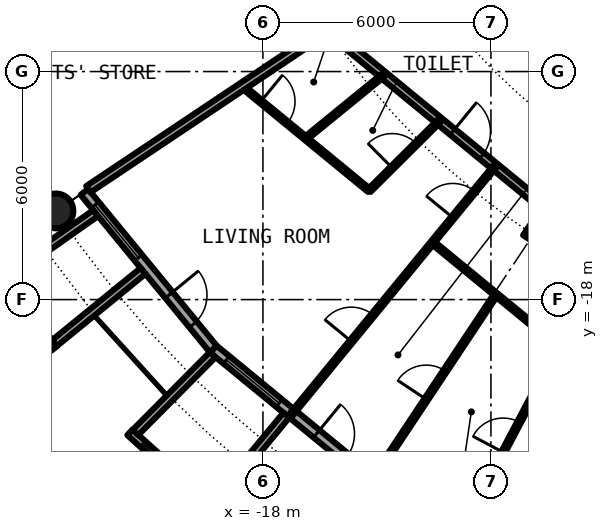
"""IFC4 building model, lengths in metres.
Left out: names, types, materials, properties, quantities, classifications, styles, units other than length and angle.
Written with IfcOpenShell. Run it as: python <this file> out.ifc"""

import sys

from ifc_helpers import new_model, si_unit, direction, frame, frame_2d, origin, origin_2d, place, context, subcontext, project, spatial, rectangle, circle, hollow_circle, i_section, extrude, element, fill, save


model = new_model("IFC4")
c1 = context("Model", 3, precision=1e-05, world=origin(), true_north=direction((0.0, 1.0)))
c2 = subcontext(c1, "Body", "Model", "MODEL_VIEW")
j1 = project(units=[si_unit("LENGTHUNIT", "METRE"), si_unit("PLANEANGLEUNIT", "RADIAN")], contexts=[c1])
p1 = place(None, origin())
s1 = spatial("IfcSite", under=j1, at=p1, CompositionType="ELEMENT")
p2 = place(p1, origin())
s2 = spatial("IfcBuilding", under=s1, at=p2, CompositionType="ELEMENT")
p3 = place(p2, frame((0.0, 0.0, 129.95)))
s3 = spatial("IfcBuildingStorey", under=s2, at=p3, CompositionType="ELEMENT", Elevation=129.95)
p4 = place(p3, frame((-23.448, -15.667, 0.0), z_axis=(0.0, 0.0, 1.0), x_axis=(1.0, 0.0, 0.0)))
e1 = element("IfcColumn", 1, at=p4, inside=s3, PredefinedType="COLUMN", context=c2, shape_type="SweptSolid", body=[
    extrude(hollow_circle(Radius=0.457, WallThickness=0.04, at=origin_2d()), origin(), (0.0, 0.0, 1.0), 3.05),
])
p5 = place(p3, frame((-10.889, -16.297, 0.0), z_axis=(0.0, 0.0, 1.0), x_axis=(-0.55557023302, -0.831469612303, 0.0)))
e2 = element("IfcColumn", 2, at=p5, inside=s3, PredefinedType="COLUMN", context=c2, shape_type="SweptSolid", body=[
    extrude(i_section(OverallWidth=0.307, OverallDepth=0.432, WebThickness=0.021, FlangeThickness=0.04, FilletRadius=0.027, at=origin_2d()), origin(), (0.0, 0.0, 1.0), 3.05),
])
p6 = place(p3, frame((-22.699, -15.167, 0.0), z_axis=(0.0, 0.0, 1.0), x_axis=(0.634382322723, -0.773019449054, 0.0)))
e3 = element("IfcWall", 3, at=p6, inside=s3, PredefinedType="SOLIDWALL", context=c2, shape_type="SweptSolid", body=[
    extrude(rectangle(XDim=5.352, YDim=0.25, at=frame_2d((2.676, 0.0))), origin(), (0.0, 0.0, 1.0), 2.7),
])
p7 = place(p6, frame((0.441, 0.0, 0.3)))
e4 = element("IfcOpeningElement", 4, at=p7, cuts=e3, PredefinedType="OPENING", context=c2, shape_type="SweptSolid", body=[
    extrude(rectangle(XDim=1.8, YDim=2.1, at=frame_2d((0.9, 1.05))), frame((0.0, 0.135, 0.0), z_axis=(0.0, -1.0, 0.0), x_axis=(1.0, 0.0, 0.0)), (0.0, 0.0, 1.0), 0.27),
])
p8 = place(p6, frame((3.51, 0.0, 0.0)))
e5 = element("IfcOpeningElement", 5, at=p8, cuts=e3, PredefinedType="OPENING", context=c2, shape_type="SweptSolid", body=[
    extrude(rectangle(XDim=1.0, YDim=2.2, at=frame_2d((0.5, 1.1))), frame((0.0, 0.135, 0.0), z_axis=(0.0, -1.0, 0.0), x_axis=(1.0, 0.0, 0.0)), (0.0, 0.0, 1.0), 0.27),
])
p9 = place(p3, frame((-24.94, -17.382, -0.03), z_axis=(0.0, 0.0, 1.0), x_axis=(0.603375996329, -0.797456837111, 0.0)))
e6 = element("IfcWall", 6, at=p9, inside=s3, PredefinedType="SOLIDWALL", context=c2, shape_type="SweptSolid", body=[
    extrude(rectangle(XDim=2.391, YDim=0.2, at=frame_2d((1.196, 0.0))), origin(), (0.0, 0.0, 1.0), 2.73),
])
p10 = place(p9, frame((0.156, 0.0, 0.33)))
e7 = element("IfcOpeningElement", 7, at=p10, cuts=e6, PredefinedType="OPENING", context=c2, shape_type="SweptSolid", body=[
    extrude(circle(Radius=1.04, at=frame_2d((1.04, 1.04))), frame((0.0, 0.11, 0.0), z_axis=(0.0, -1.0, 0.0), x_axis=(1.0, 0.0, 0.0)), (0.0, 0.0, 1.0), 0.22),
])
p11 = place(p3, frame((-22.402, -15.726, -0.03), z_axis=(0.0, 0.0, 1.0), x_axis=(-0.818275399393, -0.574826383135, 0.0)))
e8 = element("IfcWall", 8, at=p11, inside=s3, PredefinedType="SOLIDWALL", context=c2, shape_type="SweptSolid", body=[
    extrude(rectangle(XDim=2.929, YDim=0.2, at=frame_2d((1.465, 0.0))), origin(), (0.0, 0.0, 1.0), 2.73),
])
p12 = place(p3, frame((-21.155, -17.246, -0.03), z_axis=(0.0, 0.0, 1.0), x_axis=(-0.775179004516, -0.631741648902, 0.0)))
e9 = element("IfcWall", 9, at=p12, inside=s3, PredefinedType="SOLIDWALL", context=c2, shape_type="SweptSolid", body=[
    extrude(rectangle(XDim=3.006, YDim=0.2, at=frame_2d((1.503, 0.0))), origin(), (0.0, 0.0, 1.0), 2.73),
])
p13 = place(p3, frame((-19.304, -19.304, 0.0), z_axis=(0.0, 0.0, 1.0), x_axis=(0.773019449054, -0.634382322723, 0.0)))
e10 = element("IfcWall", 10, at=p13, inside=s3, PredefinedType="SOLIDWALL", context=c2, shape_type="SweptSolid", body=[
    extrude(rectangle(XDim=5.352, YDim=0.25, at=frame_2d((2.676, 0.0))), origin(), (0.0, 0.0, 1.0), 2.7),
])
p14 = place(p13, frame((0.441, 0.0, 0.3)))
e11 = element("IfcOpeningElement", 11, at=p14, cuts=e10, PredefinedType="OPENING", context=c2, shape_type="SweptSolid", body=[
    extrude(rectangle(XDim=1.8, YDim=2.1, at=frame_2d((0.9, 1.05))), frame((0.0, 0.135, 0.0), z_axis=(0.0, -1.0, 0.0), x_axis=(1.0, 0.0, 0.0)), (0.0, 0.0, 1.0), 0.27),
])
p15 = place(p13, frame((3.51, 0.0, 0.0)))
e12 = element("IfcOpeningElement", 12, at=p15, cuts=e10, PredefinedType="OPENING", context=c2, shape_type="SweptSolid", body=[
    extrude(rectangle(XDim=1.0, YDim=2.2, at=frame_2d((0.5, 1.1))), frame((0.0, 0.135, 0.0), z_axis=(0.0, -1.0, 0.0), x_axis=(1.0, 0.0, 0.0)), (0.0, 0.0, 1.0), 0.27),
])
p16 = place(p3, frame((-21.5, -21.493, -0.03), z_axis=(0.0, 0.0, 1.0), x_axis=(0.740998365753, -0.671506829416, 0.0)))
e13 = element("IfcWall", 13, at=p16, inside=s3, PredefinedType="SOLIDWALL", context=c2, shape_type="SweptSolid", body=[
    extrude(rectangle(XDim=2.993, YDim=0.2, at=frame_2d((1.497, 0.0))), origin(), (0.0, 0.0, 1.0), 2.73),
])
p17 = place(p16, frame((0.457, 0.0, 0.33)))
e14 = element("IfcOpeningElement", 14, at=p17, cuts=e13, PredefinedType="OPENING", context=c2, shape_type="SweptSolid", body=[
    extrude(circle(Radius=1.04, at=frame_2d((1.04, 1.04))), frame((0.0, 0.11, 0.0), z_axis=(0.0, -1.0, 0.0), x_axis=(1.0, 0.0, 0.0)), (0.0, 0.0, 1.0), 0.22),
])
p18 = place(p3, frame((-19.323, -19.45, -0.03), z_axis=(0.0, 0.0, 1.0), x_axis=(-0.704476739375, -0.709727076896, 0.0)))
e15 = element("IfcWall", 15, at=p18, inside=s3, PredefinedType="SOLIDWALL", context=c2, shape_type="SweptSolid", body=[
    extrude(rectangle(XDim=2.883, YDim=0.2, at=frame_2d((1.441, 0.0))), origin(), (0.0, 0.0, 1.0), 2.73),
])
p19 = place(p3, frame((-17.384, -21.041, -0.03), z_axis=(0.0, 0.0, 1.0), x_axis=(-0.63709551667, -0.770784861449, 0.0)))
e16 = element("IfcWall", 16, at=p19, inside=s3, PredefinedType="SOLIDWALL", context=c2, shape_type="SweptSolid", body=[
    extrude(rectangle(XDim=3.006, YDim=0.2, at=frame_2d((1.503, 0.0))), origin(), (0.0, 0.0, 1.0), 2.73),
])
p20 = place(p3, frame((-18.542, -12.389, 0.0), z_axis=(0.0, 0.0, 1.0), x_axis=(0.772975913823, -0.634435368379, 0.0)))
e17 = element("IfcWall", 17, at=p20, inside=s3, PredefinedType="PARTITIONING", context=c2, shape_type="SweptSolid", body=[
    extrude(rectangle(XDim=4.316, YDim=0.1, at=frame_2d((2.158, 0.0))), origin(), (0.0, 0.0, 1.0), 2.7),
])
p21 = place(p20, frame((0.629, 0.0, 0.0)))
e18 = element("IfcOpeningElement", 18, at=p21, cuts=e17, PredefinedType="OPENING", context=c2, shape_type="SweptSolid", body=[
    extrude(rectangle(XDim=0.9, YDim=2.3, at=frame_2d((0.45, 1.15))), frame((0.0, 0.06, 0.0), z_axis=(0.0, -1.0, 0.0), x_axis=(1.0, 0.0, 0.0)), (0.0, 0.0, 1.0), 0.12),
])
p22 = place(p3, frame((-13.538, -16.496, 0.0), z_axis=(0.0, 0.0, 1.0), x_axis=(0.773000340237, -0.634405606843, 0.0)))
e19 = element("IfcWall", 19, at=p22, inside=s3, PredefinedType="PARTITIONING", context=c2, shape_type="SweptSolid", body=[
    extrude(rectangle(XDim=6.474, YDim=0.1, at=frame_2d((3.237, 0.0))), origin(), (0.0, 0.0, 1.0), 2.7),
])
p23 = place(p3, frame((-16.173, -10.991, 0.0), z_axis=(0.0, 0.0, 1.0), x_axis=(0.773013989296, -0.634388975591, 0.0)))
e20 = element("IfcWall", 20, at=p23, inside=s3, PredefinedType="PARTITIONING", context=c2, shape_type="SweptSolid", body=[
    extrude(rectangle(XDim=11.219, YDim=0.2, at=frame_2d((5.609, 0.0))), origin(), (0.0, 0.0, 1.0), 2.39),
])
p24 = place(p23, frame((4.089, 0.0, 0.0)))
e21 = element("IfcOpeningElement", 21, at=p24, cuts=e20, PredefinedType="OPENING", context=c2, shape_type="SweptSolid", body=[
    extrude(rectangle(XDim=1.0, YDim=2.3, at=frame_2d((0.5, 1.15))), frame((0.0, 0.11, 0.0), z_axis=(0.0, -1.0, 0.0), x_axis=(1.0, 0.0, 0.0)), (0.0, 0.0, 1.0), 0.22),
])
p25 = place(p3, frame((-12.674, -10.216, 0.0), z_axis=(0.0, 0.0, 1.0), x_axis=(0.857761135463, -0.514048474844, 0.0)))
e22 = element("IfcWall", 22, at=p25, inside=s3, PredefinedType="PARTITIONING", context=c2, shape_type="SweptSolid", body=[
    extrude(rectangle(XDim=12.845, YDim=0.2, at=frame_2d((6.423, 0.0))), origin(), (0.0, 0.0, 1.0), 2.7),
])
p26 = place(p25, frame((7.527, 0.0, 0.0)))
e23 = element("IfcOpeningElement", 23, at=p26, cuts=e22, PredefinedType="OPENING", context=c2, shape_type="SweptSolid", body=[
    extrude(rectangle(XDim=1.0, YDim=2.3, at=frame_2d((0.5, 1.15))), frame((0.0, 0.11, 0.0), z_axis=(0.0, -1.0, 0.0), x_axis=(1.0, 0.0, 0.0)), (0.0, 0.0, 1.0), 0.22),
])
p27 = place(p3, frame((-22.595, -15.097, 0.0), z_axis=(0.0, 0.0, 1.0), x_axis=(0.831467903109, 0.555572791, 0.0)))
e24 = element("IfcWall", 24, at=p27, inside=s3, PredefinedType="PARTITIONING", context=c2, shape_type="SweptSolid", body=[
    extrude(rectangle(XDim=7.358, YDim=0.2, at=frame_2d((3.679, 0.0))), origin(), (0.0, 0.0, 1.0), 2.7),
])
p28 = place(p3, frame((-17.24, -21.007, 0.0), z_axis=(0.0, 0.0, 1.0), x_axis=(0.634396151441, 0.77300810024, 0.0)))
e25 = element("IfcWall", 25, at=p28, inside=s3, PredefinedType="PARTITIONING", context=c2, shape_type="SweptSolid", body=[
    extrude(rectangle(XDim=8.419, YDim=0.1, at=frame_2d((4.209, 0.0))), origin(), (0.0, 0.0, 1.0), 2.7),
])
p29 = place(p28, frame((6.679, 0.0, 0.0)))
e26 = element("IfcOpeningElement", 26, at=p29, cuts=e25, PredefinedType="OPENING", context=c2, shape_type="SweptSolid", body=[
    extrude(rectangle(XDim=0.9, YDim=2.3, at=frame_2d((0.45, 1.15))), frame((0.0, 0.06, 0.0), z_axis=(0.0, -1.0, 0.0), x_axis=(1.0, 0.0, 0.0)), (0.0, 0.0, 1.0), 0.12),
])
p30 = place(p28, frame((2.468, 0.0, 0.0)))
e27 = element("IfcOpeningElement", 27, at=p30, cuts=e25, PredefinedType="OPENING", context=c2, shape_type="SweptSolid", body=[
    extrude(rectangle(XDim=0.9, YDim=2.3, at=frame_2d((0.45, 1.15))), frame((0.0, 0.06, 0.0), z_axis=(0.0, -1.0, 0.0), x_axis=(1.0, 0.0, 0.0)), (0.0, 0.0, 1.0), 0.12),
])
p31 = place(p3, frame((-16.874, -13.758, 0.0), z_axis=(0.0, 0.0, 1.0), x_axis=(0.774979608522, 0.631986239072, 0.0)))
e28 = element("IfcWall", 28, at=p31, inside=s3, PredefinedType="PARTITIONING", context=c2, shape_type="SweptSolid", body=[
    extrude(rectangle(XDim=2.636, YDim=0.1, at=frame_2d((1.318, 0.0))), origin(), (0.0, 0.0, 1.0), 2.7),
])
p32 = place(p3, frame((-15.202, -15.131, 0.0), z_axis=(0.0, 0.0, 1.0), x_axis=(0.708796844581, 0.705412668665, 0.0)))
e29 = element("IfcWall", 29, at=p32, inside=s3, PredefinedType="PARTITIONING", context=c2, shape_type="SweptSolid", body=[
    extrude(rectangle(XDim=2.597, YDim=0.1, at=frame_2d((1.299, 0.0))), origin(), (0.0, 0.0, 1.0), 2.7),
])
p33 = place(p32, frame((0.849, 0.0, 0.0)))
e30 = element("IfcOpeningElement", 30, at=p33, cuts=e29, PredefinedType="OPENING", context=c2, shape_type="SweptSolid", body=[
    extrude(rectangle(XDim=0.9, YDim=2.3, at=frame_2d((0.45, 1.15))), frame((0.0, 0.06, 0.0), z_axis=(0.0, -1.0, 0.0), x_axis=(1.0, 0.0, 0.0)), (0.0, 0.0, 1.0), 0.12),
])
p34 = place(p3, frame((-15.039, -22.634, 0.0), z_axis=(0.0, 0.0, 1.0), x_axis=(0.553440102418, 0.832888980018, 0.0)))
e31 = element("IfcWall", 31, at=p34, inside=s3, PredefinedType="PARTITIONING", context=c2, shape_type="SweptSolid", body=[
    extrude(rectangle(XDim=5.726, YDim=0.1, at=frame_2d((2.863, 0.0))), origin(), (0.0, 0.0, 1.0), 2.7),
])
p35 = place(p34, frame((2.413, 0.0, 0.0)))
e32 = element("IfcOpeningElement", 32, at=p35, cuts=e31, PredefinedType="OPENING", context=c2, shape_type="SweptSolid", body=[
    extrude(rectangle(XDim=0.9, YDim=2.3, at=frame_2d((0.45, 1.15))), frame((0.0, 0.06, 0.0), z_axis=(0.0, -1.0, 0.0), x_axis=(1.0, 0.0, 0.0)), (0.0, 0.0, 1.0), 0.12),
])
p36 = place(p3, frame((-12.734, -24.007, 0.0), z_axis=(0.0, 0.0, 1.0), x_axis=(0.468610030042, 0.883405139075, 0.0)))
e33 = element("IfcWall", 33, at=p36, inside=s3, PredefinedType="PARTITIONING", context=c2, shape_type="SweptSolid", body=[
    extrude(rectangle(XDim=5.403, YDim=0.1, at=frame_2d((2.702, 0.0))), origin(), (0.0, 0.0, 1.0), 2.7),
])
p37 = place(p36, frame((2.252, 0.0, 0.0)))
e34 = element("IfcOpeningElement", 34, at=p37, cuts=e33, PredefinedType="OPENING", context=c2, shape_type="SweptSolid", body=[
    extrude(rectangle(XDim=0.9, YDim=2.3, at=frame_2d((0.45, 1.15))), frame((0.0, 0.06, 0.0), z_axis=(0.0, -1.0, 0.0), x_axis=(1.0, 0.0, 0.0)), (0.0, 0.0, 1.0), 0.12),
])
p38 = place(p7, origin())
e35 = element("IfcWindow", 35, at=p38, inside=s3, PartitioningType="SINGLE_PANEL", PredefinedType="WINDOW", context=c2, shape_type="SweptSolid", body=[
    extrude(rectangle(XDim=1.8, YDim=2.1, at=frame_2d((0.9, 1.05))), frame((0.0, 0.03, 0.0), z_axis=(0.0, -1.0, 0.0), x_axis=(1.0, 0.0, 0.0)), (0.0, 0.0, 1.0), 0.06),
])
fill(e4, e35)
p39 = place(p8, origin())
e36 = element("IfcDoor", 36, at=p39, inside=s3, OperationType="SINGLE_SWING_LEFT", PredefinedType="DOOR", context=c2, shape_type="SweptSolid", body=[
    extrude(rectangle(XDim=1.0, YDim=2.2, at=frame_2d((0.5, 1.1))), frame((0.0, 0.025, 0.0), z_axis=(0.0, -1.0, 0.0), x_axis=(1.0, 0.0, 0.0)), (0.0, 0.0, 1.0), 0.05),
])
fill(e5, e36)
p40 = place(p14, origin())
e37 = element("IfcWindow", 37, at=p40, inside=s3, PartitioningType="SINGLE_PANEL", PredefinedType="WINDOW", context=c2, shape_type="SweptSolid", body=[
    extrude(rectangle(XDim=1.8, YDim=2.1, at=frame_2d((0.9, 1.05))), frame((0.0, 0.03, 0.0), z_axis=(0.0, -1.0, 0.0), x_axis=(1.0, 0.0, 0.0)), (0.0, 0.0, 1.0), 0.06),
])
fill(e11, e37)
p41 = place(p17, origin())
e38 = element("IfcWindow", 38, at=p41, inside=s3, PartitioningType="SINGLE_PANEL", PredefinedType="WINDOW", context=c2, shape_type="SweptSolid", body=[
    extrude(circle(Radius=1.04, at=frame_2d((1.04, 1.04))), frame((0.0, 0.03, 0.0), z_axis=(0.0, -1.0, 0.0), x_axis=(1.0, 0.0, 0.0)), (0.0, 0.0, 1.0), 0.06),
])
fill(e14, e38)
p42 = place(p15, origin())
e39 = element("IfcDoor", 39, at=p42, inside=s3, OperationType="SINGLE_SWING_LEFT", PredefinedType="DOOR", context=c2, shape_type="SweptSolid", body=[
    extrude(rectangle(XDim=1.0, YDim=2.2, at=frame_2d((0.5, 1.1))), frame((0.0, 0.025, 0.0), z_axis=(0.0, -1.0, 0.0), x_axis=(1.0, 0.0, 0.0)), (0.0, 0.0, 1.0), 0.05),
])
fill(e12, e39)
p43 = place(p24, origin())
e40 = element("IfcDoor", 40, at=p43, inside=s3, OperationType="SINGLE_SWING_LEFT", PredefinedType="DOOR", context=c2, shape_type="SweptSolid", body=[
    extrude(rectangle(XDim=1.0, YDim=2.3, at=frame_2d((0.5, 1.15))), frame((0.0, 0.025, 0.0), z_axis=(0.0, -1.0, 0.0), x_axis=(1.0, 0.0, 0.0)), (0.0, 0.0, 1.0), 0.05),
])
fill(e21, e40)
p44 = place(p21, origin())
e41 = element("IfcDoor", 41, at=p44, inside=s3, OperationType="SINGLE_SWING_LEFT", PredefinedType="DOOR", context=c2, shape_type="SweptSolid", body=[
    extrude(rectangle(XDim=0.9, YDim=2.3, at=frame_2d((0.45, 1.15))), frame((0.0, 0.025, 0.0), z_axis=(0.0, -1.0, 0.0), x_axis=(1.0, 0.0, 0.0)), (0.0, 0.0, 1.0), 0.05),
])
fill(e18, e41)
p45 = place(p33, origin())
e42 = element("IfcDoor", 42, at=p45, inside=s3, OperationType="SINGLE_SWING_LEFT", PredefinedType="DOOR", context=c2, shape_type="SweptSolid", body=[
    extrude(rectangle(XDim=0.9, YDim=2.3, at=frame_2d((0.45, 1.15))), frame((0.0, 0.025, 0.0), z_axis=(0.0, -1.0, 0.0), x_axis=(1.0, 0.0, 0.0)), (0.0, 0.0, 1.0), 0.05),
])
fill(e30, e42)
p46 = place(p29, origin())
e43 = element("IfcDoor", 43, at=p46, inside=s3, OperationType="SINGLE_SWING_RIGHT", PredefinedType="DOOR", context=c2, shape_type="SweptSolid", body=[
    extrude(rectangle(XDim=0.9, YDim=2.3, at=frame_2d((0.45, 1.15))), frame((0.0, 0.025, 0.0), z_axis=(0.0, -1.0, 0.0), x_axis=(1.0, 0.0, 0.0)), (0.0, 0.0, 1.0), 0.05),
])
fill(e26, e43)
p47 = place(p30, origin())
e44 = element("IfcDoor", 44, at=p47, inside=s3, OperationType="SINGLE_SWING_LEFT", PredefinedType="DOOR", context=c2, shape_type="SweptSolid", body=[
    extrude(rectangle(XDim=0.9, YDim=2.3, at=frame_2d((0.45, 1.15))), frame((0.0, 0.025, 0.0), z_axis=(0.0, -1.0, 0.0), x_axis=(1.0, 0.0, 0.0)), (0.0, 0.0, 1.0), 0.05),
])
fill(e27, e44)
p48 = place(p35, origin())
e45 = element("IfcDoor", 45, at=p48, inside=s3, OperationType="SINGLE_SWING_RIGHT", PredefinedType="DOOR", context=c2, shape_type="SweptSolid", body=[
    extrude(rectangle(XDim=0.9, YDim=2.3, at=frame_2d((0.45, 1.15))), frame((0.0, 0.025, 0.0), z_axis=(0.0, -1.0, 0.0), x_axis=(1.0, 0.0, 0.0)), (0.0, 0.0, 1.0), 0.05),
])
fill(e32, e45)
p49 = place(p37, origin())
e46 = element("IfcDoor", 46, at=p49, inside=s3, OperationType="SINGLE_SWING_LEFT", PredefinedType="DOOR", context=c2, shape_type="SweptSolid", body=[
    extrude(rectangle(XDim=0.9, YDim=2.3, at=frame_2d((0.45, 1.15))), frame((0.0, 0.025, 0.0), z_axis=(0.0, -1.0, 0.0), x_axis=(1.0, 0.0, 0.0)), (0.0, 0.0, 1.0), 0.05),
])
fill(e34, e46)
save(model, sys.argv[1])
